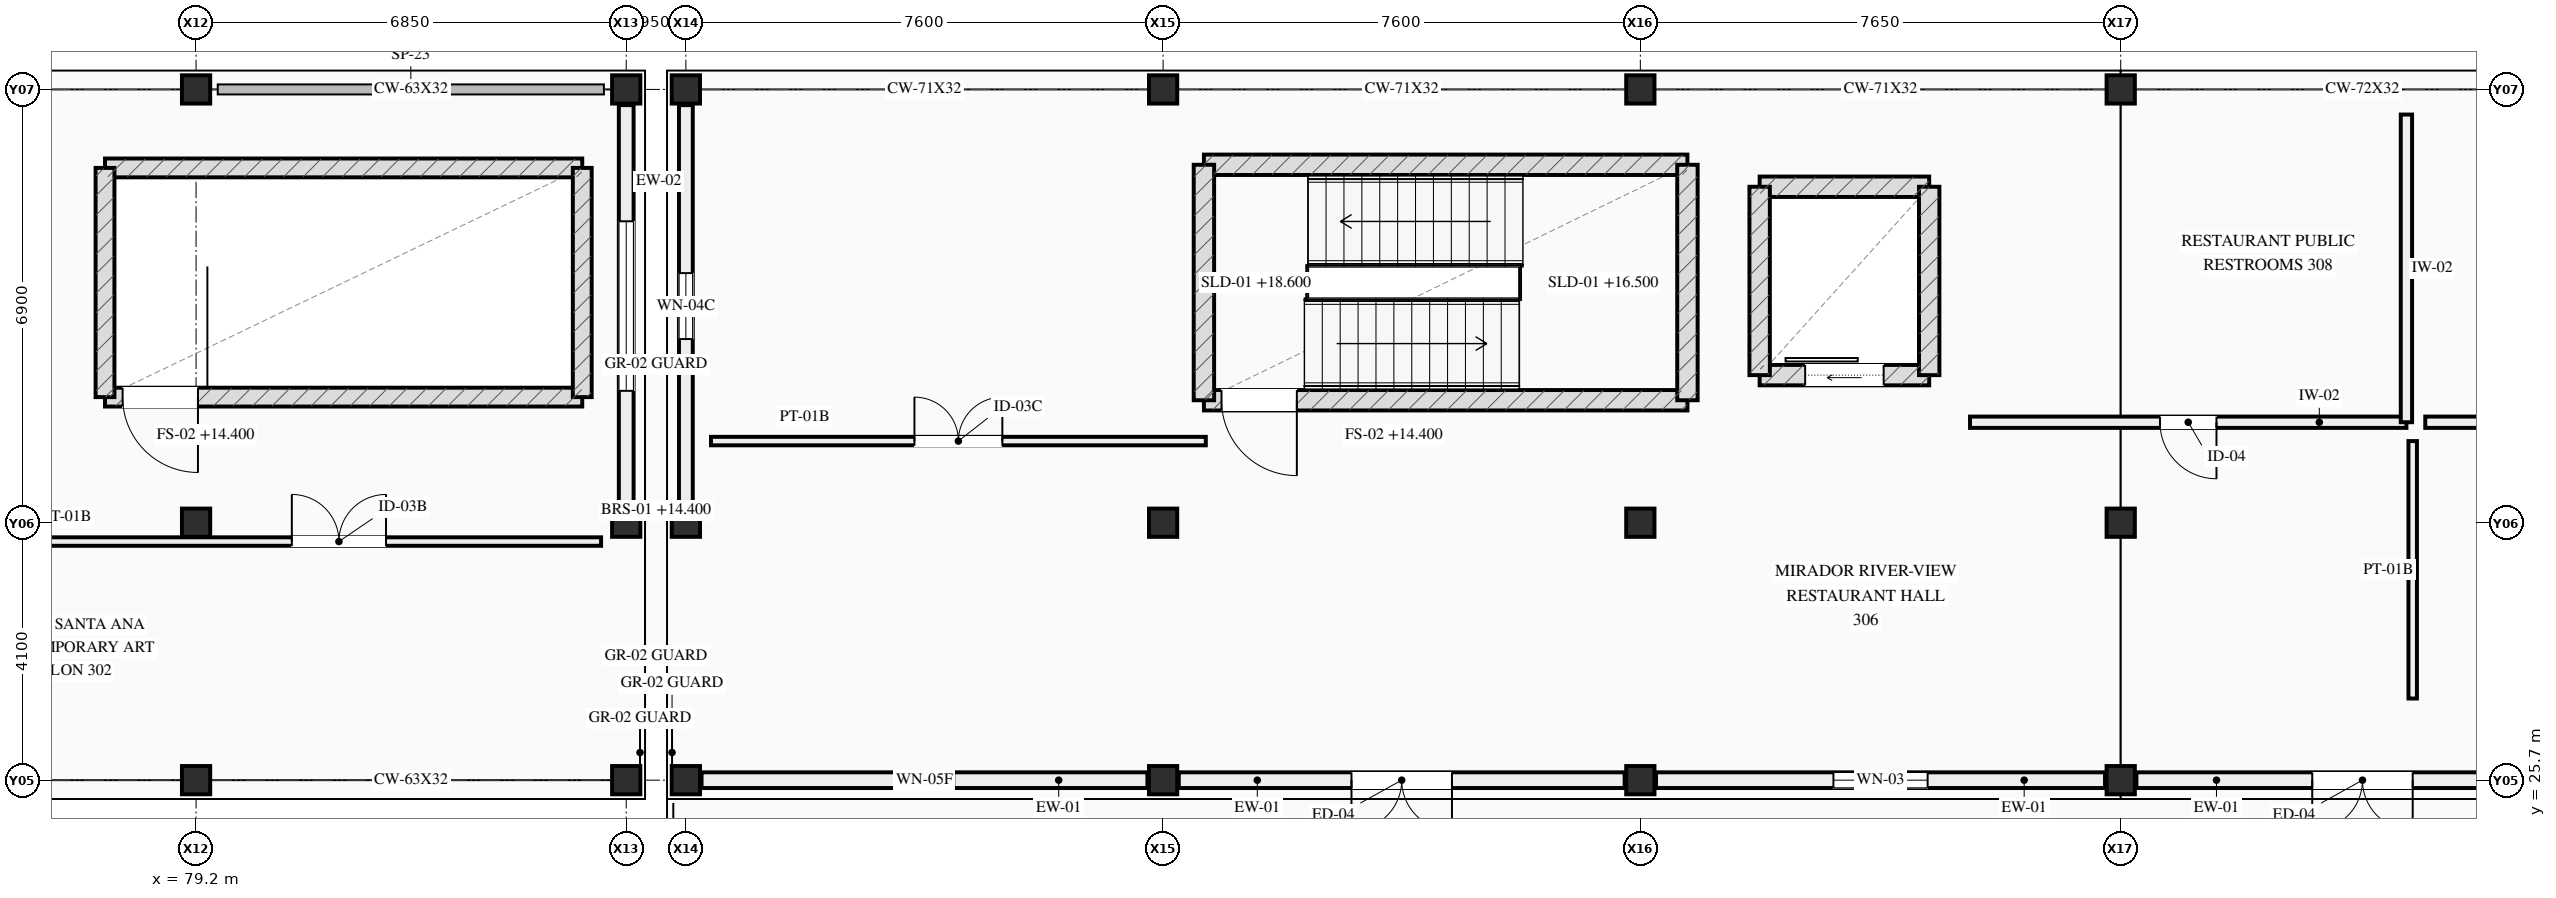
"""IFC4 building model, lengths in metres.
Left out: names, types, materials, properties, quantities, classifications, styles, units other than length and angle.
Written with IfcOpenShell. Run it as: python <this file> out.ifc"""

import sys

from ifc_helpers import new_model, si_unit, direction, frame, frame_2d, origin, origin_2d, place, context, subcontext, project, spatial, rectangle, extrude, element, fill, save


model = new_model("IFC4")
c1 = context("Model", 3, precision=1e-05, world=origin(), true_north=direction((0.0, 1.0)))
c2 = subcontext(c1, "Body", "Model", "MODEL_VIEW")
j1 = project(units=[si_unit("LENGTHUNIT", "METRE"), si_unit("PLANEANGLEUNIT", "RADIAN")], contexts=[c1])
p1 = place(None, origin())
s1 = spatial("IfcSite", under=j1, at=p1, CompositionType="ELEMENT")
p2 = place(p1, origin())
s2 = spatial("IfcBuilding", under=s1, at=p2, CompositionType="ELEMENT")
p3 = place(p2, frame((0.0, 0.0, 14.4)))
s3 = spatial("IfcBuildingStorey", under=s2, at=p3, CompositionType="ELEMENT", Elevation=14.4)
for number, where, z_axis, x_axis in (
    (1, (79.2, 25.7, 0.0), (0.0, 0.0, 1.0), (1.0, 0.0, 0.0)),
    (2, (79.2, 29.8, 0.0), (0.0, 0.0, 1.0), (1.0, 0.0, 0.0)),
    (3, (79.2, 36.7, 0.0), (0.0, 0.0, 1.0), (1.0, 0.0, 0.0)),
    (4, (86.05, 25.7, 0.0), (0.0, 0.0, 1.0), (1.0, 0.0, 0.0)),
    (5, (86.05, 29.8, 0.0), (0.0, 0.0, 1.0), (1.0, 0.0, 0.0)),
    (6, (86.05, 36.7, 0.0), (0.0, 0.0, 1.0), (1.0, 0.0, 0.0)),
    (7, (87.0, 25.7, 0.0), (0.0, 0.0, 1.0), (1.0, 0.0, 0.0)),
    (8, (87.0, 29.8, 0.0), (0.0, 0.0, 1.0), (1.0, 0.0, 0.0)),
    (9, (87.0, 36.7, 0.0), (0.0, 0.0, 1.0), (1.0, 0.0, 0.0)),
    (10, (94.6, 25.7, 0.0), (0.0, 0.0, 1.0), (1.0, 0.0, 0.0)),
    (11, (94.6, 29.8, 0.0), (0.0, 0.0, 1.0), (1.0, 0.0, 0.0)),
    (12, (94.6, 36.7, 0.0), (0.0, 0.0, 1.0), (1.0, 0.0, 0.0)),
    (13, (102.2, 25.7, 0.0), (0.0, 0.0, 1.0), (1.0, 0.0, 0.0)),
    (14, (102.2, 29.8, 0.0), (0.0, 0.0, 1.0), (1.0, 0.0, 0.0)),
    (15, (102.2, 36.7, 0.0), (0.0, 0.0, 1.0), (1.0, 0.0, 0.0)),
    (16, (109.85, 25.7, 0.0), (0.0, 0.0, 1.0), (1.0, 0.0, 0.0)),
    (17, (109.85, 29.8, 0.0), (0.0, 0.0, 1.0), (1.0, 0.0, 0.0)),
    (18, (109.85, 36.7, 0.0), (0.0, 0.0, 1.0), (1.0, 0.0, 0.0)),
):
    element("IfcColumn", number, at=place(p3, frame(where, z_axis=z_axis, x_axis=x_axis)), inside=s3, PredefinedType="COLUMN", context=c2, shape_type="SweptSolid", body=[
        extrude(rectangle(XDim=0.45, YDim=0.45, at=origin_2d()), origin(), (0.0, 0.0, 1.0), 4.2),
    ])
p4 = place(p3, frame((86.05, 36.45, 0.0), z_axis=(0.0, 0.0, 1.0), x_axis=(0.0, -1.0, 0.0)))
e19 = element("IfcWall", 19, at=p4, inside=s3, PredefinedType="STANDARD", context=c2, shape_type="SweptSolid", body=[
    extrude(rectangle(XDim=6.4, YDim=0.235, at=frame_2d((3.2, 0.0))), origin(), (0.0, 0.0, 1.0), 3.28),
])
p5 = place(p4, frame((1.85, 0.0, 0.88)))
e20 = element("IfcOpeningElement", 20, at=p5, cuts=e19, PredefinedType="OPENING", context=c2, shape_type="SweptSolid", body=[
    extrude(rectangle(XDim=2.7, YDim=1.45, at=frame_2d((1.35, 0.725))), frame((0.0, 0.127, 0.0), z_axis=(0.0, -1.0, 0.0), x_axis=(1.0, 0.0, 0.0)), (0.0, 0.0, 1.0), 0.255),
])
p6 = place(p3, frame((94.35, 25.7, 0.0), z_axis=(0.0, 0.0, 1.0), x_axis=(-1.0, 0.0, 0.0)))
e21 = element("IfcWall", 21, at=p6, inside=s3, PredefinedType="STANDARD", context=c2, shape_type="SweptSolid", body=[
    extrude(rectangle(XDim=7.1, YDim=0.25, at=frame_2d((3.55, 0.0))), origin(), (0.0, 0.0, 1.0), 3.28),
])
p7 = place(p6, frame((3.075, 0.0, 1.08)))
e22 = element("IfcOpeningElement", 22, at=p7, cuts=e21, PredefinedType="OPENING", context=c2, shape_type="SweptSolid", body=[
    extrude(rectangle(XDim=0.95, YDim=1.05, at=frame_2d((0.475, 0.525))), frame((0.0, 0.135, 0.0), z_axis=(0.0, -1.0, 0.0), x_axis=(1.0, 0.0, 0.0)), (0.0, 0.0, 1.0), 0.27),
])
p8 = place(p3, frame((101.95, 25.7, 0.0), z_axis=(0.0, 0.0, 1.0), x_axis=(-1.0, 0.0, 0.0)))
e23 = element("IfcWall", 23, at=p8, inside=s3, PredefinedType="STANDARD", context=c2, shape_type="SweptSolid", body=[
    extrude(rectangle(XDim=7.1, YDim=0.25, at=frame_2d((3.55, 0.0))), origin(), (0.0, 0.0, 1.0), 3.28),
])
p9 = place(p8, frame((2.75, 0.0, 0.0)))
e24 = element("IfcOpeningElement", 24, at=p9, cuts=e23, PredefinedType="OPENING", context=c2, shape_type="SweptSolid", body=[
    extrude(rectangle(XDim=1.6, YDim=2.2, at=frame_2d((0.8, 1.1))), frame((0.0, 0.135, 0.0), z_axis=(0.0, -1.0, 0.0), x_axis=(1.0, 0.0, 0.0)), (0.0, 0.0, 1.0), 0.27),
])
p10 = place(p3, frame((109.6, 25.7, 0.0), z_axis=(0.0, 0.0, 1.0), x_axis=(-1.0, 0.0, 0.0)))
e25 = element("IfcWall", 25, at=p10, inside=s3, PredefinedType="STANDARD", context=c2, shape_type="SweptSolid", body=[
    extrude(rectangle(XDim=7.15, YDim=0.25, at=frame_2d((3.575, 0.0))), origin(), (0.0, 0.0, 1.0), 3.28),
])
p11 = place(p10, frame((2.825, 0.0, 0.95)))
e26 = element("IfcOpeningElement", 26, at=p11, cuts=e25, PredefinedType="OPENING", context=c2, shape_type="SweptSolid", body=[
    extrude(rectangle(XDim=1.5, YDim=1.45, at=frame_2d((0.75, 0.725))), frame((0.0, 0.135, 0.0), z_axis=(0.0, -1.0, 0.0), x_axis=(1.0, 0.0, 0.0)), (0.0, 0.0, 1.0), 0.27),
])
p12 = place(p3, frame((117.3, 25.7, 0.0), z_axis=(0.0, 0.0, 1.0), x_axis=(-1.0, 0.0, 0.0)))
e27 = element("IfcWall", 27, at=p12, inside=s3, PredefinedType="STANDARD", context=c2, shape_type="SweptSolid", body=[
    extrude(rectangle(XDim=7.2, YDim=0.25, at=frame_2d((3.6, 0.0))), origin(), (0.0, 0.0, 1.0), 3.28),
])
p13 = place(p12, frame((2.8, 0.0, 0.0)))
e28 = element("IfcOpeningElement", 28, at=p13, cuts=e27, PredefinedType="OPENING", context=c2, shape_type="SweptSolid", body=[
    extrude(rectangle(XDim=1.6, YDim=2.2, at=frame_2d((0.8, 1.1))), frame((0.0, 0.135, 0.0), z_axis=(0.0, -1.0, 0.0), x_axis=(1.0, 0.0, 0.0)), (0.0, 0.0, 1.0), 0.27),
])
p14 = place(p3, frame((87.0, 30.05, 0.0), z_axis=(0.0, 0.0, 1.0), x_axis=(0.0, 1.0, 0.0)))
e29 = element("IfcWall", 29, at=p14, inside=s3, PredefinedType="STANDARD", context=c2, shape_type="SweptSolid", body=[
    extrude(rectangle(XDim=6.4, YDim=0.22, at=frame_2d((3.2, 0.0))), origin(), (0.0, 0.0, 1.0), 3.28),
])
p15 = place(p14, frame((2.675, 0.0, 1.02)))
e30 = element("IfcOpeningElement", 30, at=p15, cuts=e29, PredefinedType="OPENING", context=c2, shape_type="SweptSolid", body=[
    extrude(rectangle(XDim=1.05, YDim=1.2, at=frame_2d((0.525, 0.6))), frame((0.0, 0.12, 0.0), z_axis=(0.0, -1.0, 0.0), x_axis=(1.0, 0.0, 0.0)), (0.0, 0.0, 1.0), 0.24),
])
p16 = place(p3, frame((77.75, 31.8, 0.0), z_axis=(0.0, 0.0, 1.0), x_axis=(1.0, 0.0, 0.0)))
e31 = element("IfcWall", 31, at=p16, inside=s3, PredefinedType="SHEAR", context=c2, shape_type="SweptSolid", body=[
    extrude(rectangle(XDim=7.6, YDim=0.3, at=frame_2d((3.8, 0.0))), origin(), (0.0, 0.0, 1.0), 3.99),
])
p17 = place(p16, frame((0.28, 0.0, 0.0)))
e32 = element("IfcOpeningElement", 32, at=p17, cuts=e31, PredefinedType="OPENING", context=c2, shape_type="SweptSolid", body=[
    extrude(rectangle(XDim=1.2, YDim=2.2, at=frame_2d((0.6, 1.1))), frame((0.0, 0.16, 0.0), z_axis=(0.0, -1.0, 0.0), x_axis=(1.0, 0.0, 0.0)), (0.0, 0.0, 1.0), 0.32),
])
p18 = place(p3, frame((85.35, 35.45, 0.0), z_axis=(0.0, 0.0, 1.0), x_axis=(-1.0, 0.0, 0.0)))
e33 = element("IfcWall", 33, at=p18, inside=s3, PredefinedType="SHEAR", context=c2, shape_type="SweptSolid", body=[
    extrude(rectangle(XDim=7.6, YDim=0.3, at=frame_2d((3.8, 0.0))), origin(), (0.0, 0.0, 1.0), 3.99),
])
for number, where, z_axis, x_axis in (
    (34, (77.75, 35.45, 0.0), (0.0, 0.0, 1.0), (0.0, -1.0, 0.0)),
    (35, (85.35, 31.8, 0.0), (0.0, 0.0, 1.0), (0.0, 1.0, 0.0)),
):
    element("IfcWall", number, at=place(p3, frame(where, z_axis=z_axis, x_axis=x_axis)), inside=s3, PredefinedType="SHEAR", context=c2, shape_type="SweptSolid", body=[
        extrude(rectangle(XDim=3.65, YDim=0.3, at=frame_2d((1.825, 0.0))), origin(), (0.0, 0.0, 1.0), 3.99),
    ])
p19 = place(p3, frame((95.25, 31.75, 0.0), z_axis=(0.0, 0.0, 1.0), x_axis=(1.0, 0.0, 0.0)))
e36 = element("IfcWall", 36, at=p19, inside=s3, PredefinedType="SHEAR", context=c2, shape_type="SweptSolid", body=[
    extrude(rectangle(XDim=7.7, YDim=0.325, at=frame_2d((3.85, 0.0))), origin(), (0.0, 0.0, 1.0), 3.99),
])
p20 = place(p19, frame((0.28, 0.0, 0.0)))
e37 = element("IfcOpeningElement", 37, at=p20, cuts=e36, PredefinedType="OPENING", context=c2, shape_type="SweptSolid", body=[
    extrude(rectangle(XDim=1.2, YDim=2.2, at=frame_2d((0.6, 1.1))), frame((0.0, 0.172, 0.0), z_axis=(0.0, -1.0, 0.0), x_axis=(1.0, 0.0, 0.0)), (0.0, 0.0, 1.0), 0.345),
])
p21 = place(p3, frame((102.95, 35.5, 0.0), z_axis=(0.0, 0.0, 1.0), x_axis=(-1.0, 0.0, 0.0)))
e38 = element("IfcWall", 38, at=p21, inside=s3, PredefinedType="SHEAR", context=c2, shape_type="SweptSolid", body=[
    extrude(rectangle(XDim=7.7, YDim=0.325, at=frame_2d((3.85, 0.0))), origin(), (0.0, 0.0, 1.0), 3.99),
])
for number, where, z_axis, x_axis in (
    (39, (95.25, 35.5, 0.0), (0.0, 0.0, 1.0), (0.0, -1.0, 0.0)),
    (40, (102.95, 31.75, 0.0), (0.0, 0.0, 1.0), (0.0, 1.0, 0.0)),
):
    element("IfcWall", number, at=place(p3, frame(where, z_axis=z_axis, x_axis=x_axis)), inside=s3, PredefinedType="SHEAR", context=c2, shape_type="SweptSolid", body=[
        extrude(rectangle(XDim=3.75, YDim=0.325, at=frame_2d((1.875, 0.0))), origin(), (0.0, 0.0, 1.0), 3.99),
    ])
p22 = place(p3, frame((104.1, 32.15, 0.0), z_axis=(0.0, 0.0, 1.0), x_axis=(1.0, 0.0, 0.0)))
e41 = element("IfcWall", 41, at=p22, inside=s3, PredefinedType="SHEAR", context=c2, shape_type="SweptSolid", body=[
    extrude(rectangle(XDim=2.7, YDim=0.325, at=frame_2d((1.35, 0.0))), origin(), (0.0, 0.0, 1.0), 3.99),
])
p23 = place(p22, frame((0.725, 0.0, 0.0)))
e42 = element("IfcOpeningElement", 42, at=p23, cuts=e41, PredefinedType="OPENING", context=c2, shape_type="SweptSolid", body=[
    extrude(rectangle(XDim=1.25, YDim=2.2, at=frame_2d((0.625, 1.1))), frame((0.0, 0.172, 0.0), z_axis=(0.0, -1.0, 0.0), x_axis=(1.0, 0.0, 0.0)), (0.0, 0.0, 1.0), 0.345),
])
p24 = place(p3, frame((104.1, 35.15, 0.0), z_axis=(0.0, 0.0, 1.0), x_axis=(1.0, 0.0, 0.0)))
e43 = element("IfcWall", 43, at=p24, inside=s3, PredefinedType="SHEAR", context=c2, shape_type="SweptSolid", body=[
    extrude(rectangle(XDim=2.7, YDim=0.325, at=frame_2d((1.35, 0.0))), origin(), (0.0, 0.0, 1.0), 3.99),
])
for number, where, z_axis, x_axis in (
    (44, (104.1, 32.15, 0.0), (0.0, 0.0, 1.0), (0.0, 1.0, 0.0)),
    (45, (106.8, 32.15, 0.0), (0.0, 0.0, 1.0), (0.0, 1.0, 0.0)),
):
    element("IfcWall", number, at=place(p3, frame(where, z_axis=z_axis, x_axis=x_axis)), inside=s3, PredefinedType="SHEAR", context=c2, shape_type="SweptSolid", body=[
        extrude(rectangle(XDim=3.0, YDim=0.325, at=frame_2d((1.5, 0.0))), origin(), (0.0, 0.0, 1.0), 3.99),
    ])
p25 = place(p3, frame((73.8, 29.5, 0.0), z_axis=(0.0, 0.0, 1.0), x_axis=(1.0, 0.0, 0.0)))
e46 = element("IfcWall", 46, at=p25, inside=s3, PredefinedType="PARTITIONING", context=c2, shape_type="SweptSolid", body=[
    extrude(rectangle(XDim=11.85, YDim=0.135, at=frame_2d((5.925, 0.0))), origin(), (0.0, 0.0, 1.0), 3.05),
])
p26 = place(p25, frame((6.925, 0.0, 0.0)))
e47 = element("IfcOpeningElement", 47, at=p26, cuts=e46, PredefinedType="OPENING", context=c2, shape_type="SweptSolid", body=[
    extrude(rectangle(XDim=1.5, YDim=2.2, at=frame_2d((0.75, 1.1))), frame((0.0, 0.077, 0.0), z_axis=(0.0, -1.0, 0.0), x_axis=(1.0, 0.0, 0.0)), (0.0, 0.0, 1.0), 0.155),
])
p27 = place(p3, frame((87.4, 31.1, 0.0), z_axis=(0.0, 0.0, 1.0), x_axis=(1.0, 0.0, 0.0)))
e48 = element("IfcWall", 48, at=p27, inside=s3, PredefinedType="PARTITIONING", context=c2, shape_type="SweptSolid", body=[
    extrude(rectangle(XDim=7.88, YDim=0.135, at=frame_2d((3.94, 0.0))), origin(), (0.0, 0.0, 1.0), 3.05),
])
p28 = place(p27, frame((3.24, 0.0, 0.0)))
e49 = element("IfcOpeningElement", 49, at=p28, cuts=e48, PredefinedType="OPENING", context=c2, shape_type="SweptSolid", body=[
    extrude(rectangle(XDim=1.4, YDim=2.15, at=frame_2d((0.7, 1.075))), frame((0.0, 0.077, 0.0), z_axis=(0.0, -1.0, 0.0), x_axis=(1.0, 0.0, 0.0)), (0.0, 0.0, 1.0), 0.155),
])
p29 = place(p3, frame((114.5, 27.0, 0.0), z_axis=(0.0, 0.0, 1.0), x_axis=(0.0, 1.0, 0.0)))
e50 = element("IfcWall", 50, at=p29, inside=s3, PredefinedType="PARTITIONING", context=c2, shape_type="SweptSolid", body=[
    extrude(rectangle(XDim=4.1, YDim=0.135, at=frame_2d((2.05, 0.0))), origin(), (0.0, 0.0, 1.0), 3.05),
])
p30 = place(p3, frame((107.45, 31.4, 0.0), z_axis=(0.0, 0.0, 1.0), x_axis=(1.0, 0.0, 0.0)))
e51 = element("IfcWall", 51, at=p30, inside=s3, PredefinedType="PLUMBINGWALL", context=c2, shape_type="SweptSolid", body=[
    extrude(rectangle(XDim=6.95, YDim=0.18, at=frame_2d((3.475, 0.0))), origin(), (0.0, 0.0, 1.0), 3.05),
])
p31 = place(p30, frame((3.025, 0.0, 0.0)))
e52 = element("IfcOpeningElement", 52, at=p31, cuts=e51, PredefinedType="OPENING", context=c2, shape_type="SweptSolid", body=[
    extrude(rectangle(XDim=0.9, YDim=2.1, at=frame_2d((0.45, 1.05))), frame((0.0, 0.1, 0.0), z_axis=(0.0, -1.0, 0.0), x_axis=(1.0, 0.0, 0.0)), (0.0, 0.0, 1.0), 0.2),
])
p32 = place(p3, frame((114.4, 31.4, 0.0), z_axis=(0.0, 0.0, 1.0), x_axis=(0.0, 1.0, 0.0)))
e53 = element("IfcWall", 53, at=p32, inside=s3, PredefinedType="PLUMBINGWALL", context=c2, shape_type="SweptSolid", body=[
    extrude(rectangle(XDim=4.9, YDim=0.18, at=frame_2d((2.45, 0.0))), origin(), (0.0, 0.0, 1.0), 3.05),
])
p33 = place(p3, frame((114.7, 31.4, 0.0), z_axis=(0.0, 0.0, 1.0), x_axis=(1.0, 0.0, 0.0)))
e54 = element("IfcWall", 54, at=p33, inside=s3, PredefinedType="PLUMBINGWALL", context=c2, shape_type="SweptSolid", body=[
    extrude(rectangle(XDim=5.5, YDim=0.18, at=frame_2d((2.75, 0.0))), origin(), (0.0, 0.0, 1.0), 3.05),
])
p34 = place(p33, frame((1.24, 0.0, 0.0)))
e55 = element("IfcOpeningElement", 55, at=p34, cuts=e54, PredefinedType="OPENING", context=c2, shape_type="SweptSolid", body=[
    extrude(rectangle(XDim=0.92, YDim=2.1, at=frame_2d((0.46, 1.05))), frame((0.0, 0.1, 0.0), z_axis=(0.0, -1.0, 0.0), x_axis=(1.0, 0.0, 0.0)), (0.0, 0.0, 1.0), 0.2),
])
p35 = place(p5, origin())
e56 = element("IfcWindow", 56, at=p35, inside=s3, PartitioningType="SINGLE_PANEL", PredefinedType="WINDOW", context=c2, shape_type="SweptSolid", body=[
    extrude(rectangle(XDim=2.7, YDim=1.45, at=frame_2d((1.35, 0.725))), frame((0.0, 0.03, 0.0), z_axis=(0.0, -1.0, 0.0), x_axis=(1.0, 0.0, 0.0)), (0.0, 0.0, 1.0), 0.06),
])
fill(e20, e56)
p36 = place(p7, origin())
e57 = element("IfcWindow", 57, at=p36, inside=s3, PartitioningType="SINGLE_PANEL", PredefinedType="WINDOW", context=c2, shape_type="SweptSolid", body=[
    extrude(rectangle(XDim=0.95, YDim=1.05, at=frame_2d((0.475, 0.525))), frame((0.0, 0.03, 0.0), z_axis=(0.0, -1.0, 0.0), x_axis=(1.0, 0.0, 0.0)), (0.0, 0.0, 1.0), 0.06),
])
fill(e22, e57)
p37 = place(p9, origin())
e58 = element("IfcDoor", 58, at=p37, inside=s3, OperationType="DOUBLE_DOOR_SINGLE_SWING", PredefinedType="DOOR", context=c2, shape_type="SweptSolid", body=[
    extrude(rectangle(XDim=1.6, YDim=2.2, at=frame_2d((0.8, 1.1))), frame((0.0, 0.025, 0.0), z_axis=(0.0, -1.0, 0.0), x_axis=(1.0, 0.0, 0.0)), (0.0, 0.0, 1.0), 0.05),
])
fill(e24, e58)
p38 = place(p11, origin())
e59 = element("IfcWindow", 59, at=p38, inside=s3, PartitioningType="SINGLE_PANEL", PredefinedType="WINDOW", context=c2, shape_type="SweptSolid", body=[
    extrude(rectangle(XDim=1.5, YDim=1.45, at=frame_2d((0.75, 0.725))), frame((0.0, 0.03, 0.0), z_axis=(0.0, -1.0, 0.0), x_axis=(1.0, 0.0, 0.0)), (0.0, 0.0, 1.0), 0.06),
])
fill(e26, e59)
p39 = place(p13, origin())
e60 = element("IfcDoor", 60, at=p39, inside=s3, OperationType="DOUBLE_DOOR_SINGLE_SWING", PredefinedType="DOOR", context=c2, shape_type="SweptSolid", body=[
    extrude(rectangle(XDim=1.6, YDim=2.2, at=frame_2d((0.8, 1.1))), frame((0.0, 0.025, 0.0), z_axis=(0.0, -1.0, 0.0), x_axis=(1.0, 0.0, 0.0)), (0.0, 0.0, 1.0), 0.05),
])
fill(e28, e60)
p40 = place(p15, origin())
e61 = element("IfcWindow", 61, at=p40, inside=s3, PartitioningType="SINGLE_PANEL", PredefinedType="WINDOW", context=c2, shape_type="SweptSolid", body=[
    extrude(rectangle(XDim=1.05, YDim=1.2, at=frame_2d((0.525, 0.6))), frame((0.0, 0.03, 0.0), z_axis=(0.0, -1.0, 0.0), x_axis=(1.0, 0.0, 0.0)), (0.0, 0.0, 1.0), 0.06),
])
fill(e30, e61)
p41 = place(p17, origin())
e62 = element("IfcDoor", 62, at=p41, inside=s3, OperationType="SINGLE_SWING_RIGHT", PredefinedType="DOOR", context=c2, shape_type="SweptSolid", body=[
    extrude(rectangle(XDim=1.2, YDim=2.2, at=frame_2d((0.6, 1.1))), frame((0.0, 0.025, 0.0), z_axis=(0.0, -1.0, 0.0), x_axis=(1.0, 0.0, 0.0)), (0.0, 0.0, 1.0), 0.05),
])
fill(e32, e62)
p42 = place(p20, origin())
e63 = element("IfcDoor", 63, at=p42, inside=s3, OperationType="SINGLE_SWING_RIGHT", PredefinedType="DOOR", context=c2, shape_type="SweptSolid", body=[
    extrude(rectangle(XDim=1.2, YDim=2.2, at=frame_2d((0.6, 1.1))), frame((0.0, 0.025, 0.0), z_axis=(0.0, -1.0, 0.0), x_axis=(1.0, 0.0, 0.0)), (0.0, 0.0, 1.0), 0.05),
])
fill(e37, e63)
p43 = place(p23, origin())
e64 = element("IfcDoor", 64, at=p43, inside=s3, OperationType="SLIDING_TO_LEFT", PredefinedType="DOOR", context=c2, shape_type="SweptSolid", body=[
    extrude(rectangle(XDim=1.25, YDim=2.2, at=frame_2d((0.625, 1.1))), frame((0.0, 0.025, 0.0), z_axis=(0.0, -1.0, 0.0), x_axis=(1.0, 0.0, 0.0)), (0.0, 0.0, 1.0), 0.05),
])
fill(e42, e64)
p44 = place(p26, origin())
e65 = element("IfcDoor", 65, at=p44, inside=s3, OperationType="DOUBLE_DOOR_SINGLE_SWING", PredefinedType="DOOR", context=c2, shape_type="SweptSolid", body=[
    extrude(rectangle(XDim=1.5, YDim=2.2, at=frame_2d((0.75, 1.1))), frame((0.0, 0.025, 0.0), z_axis=(0.0, -1.0, 0.0), x_axis=(1.0, 0.0, 0.0)), (0.0, 0.0, 1.0), 0.05),
])
fill(e47, e65)
p45 = place(p28, origin())
e66 = element("IfcDoor", 66, at=p45, inside=s3, OperationType="DOUBLE_DOOR_SINGLE_SWING", PredefinedType="DOOR", context=c2, shape_type="SweptSolid", body=[
    extrude(rectangle(XDim=1.4, YDim=2.15, at=frame_2d((0.7, 1.075))), frame((0.0, 0.025, 0.0), z_axis=(0.0, -1.0, 0.0), x_axis=(1.0, 0.0, 0.0)), (0.0, 0.0, 1.0), 0.05),
])
fill(e49, e66)
p46 = place(p31, origin())
e67 = element("IfcDoor", 67, at=p46, inside=s3, OperationType="SINGLE_SWING_RIGHT", PredefinedType="DOOR", context=c2, shape_type="SweptSolid", body=[
    extrude(rectangle(XDim=0.9, YDim=2.1, at=frame_2d((0.45, 1.05))), frame((0.0, 0.025, 0.0), z_axis=(0.0, -1.0, 0.0), x_axis=(1.0, 0.0, 0.0)), (0.0, 0.0, 1.0), 0.05),
])
fill(e52, e67)
save(model, sys.argv[1])
